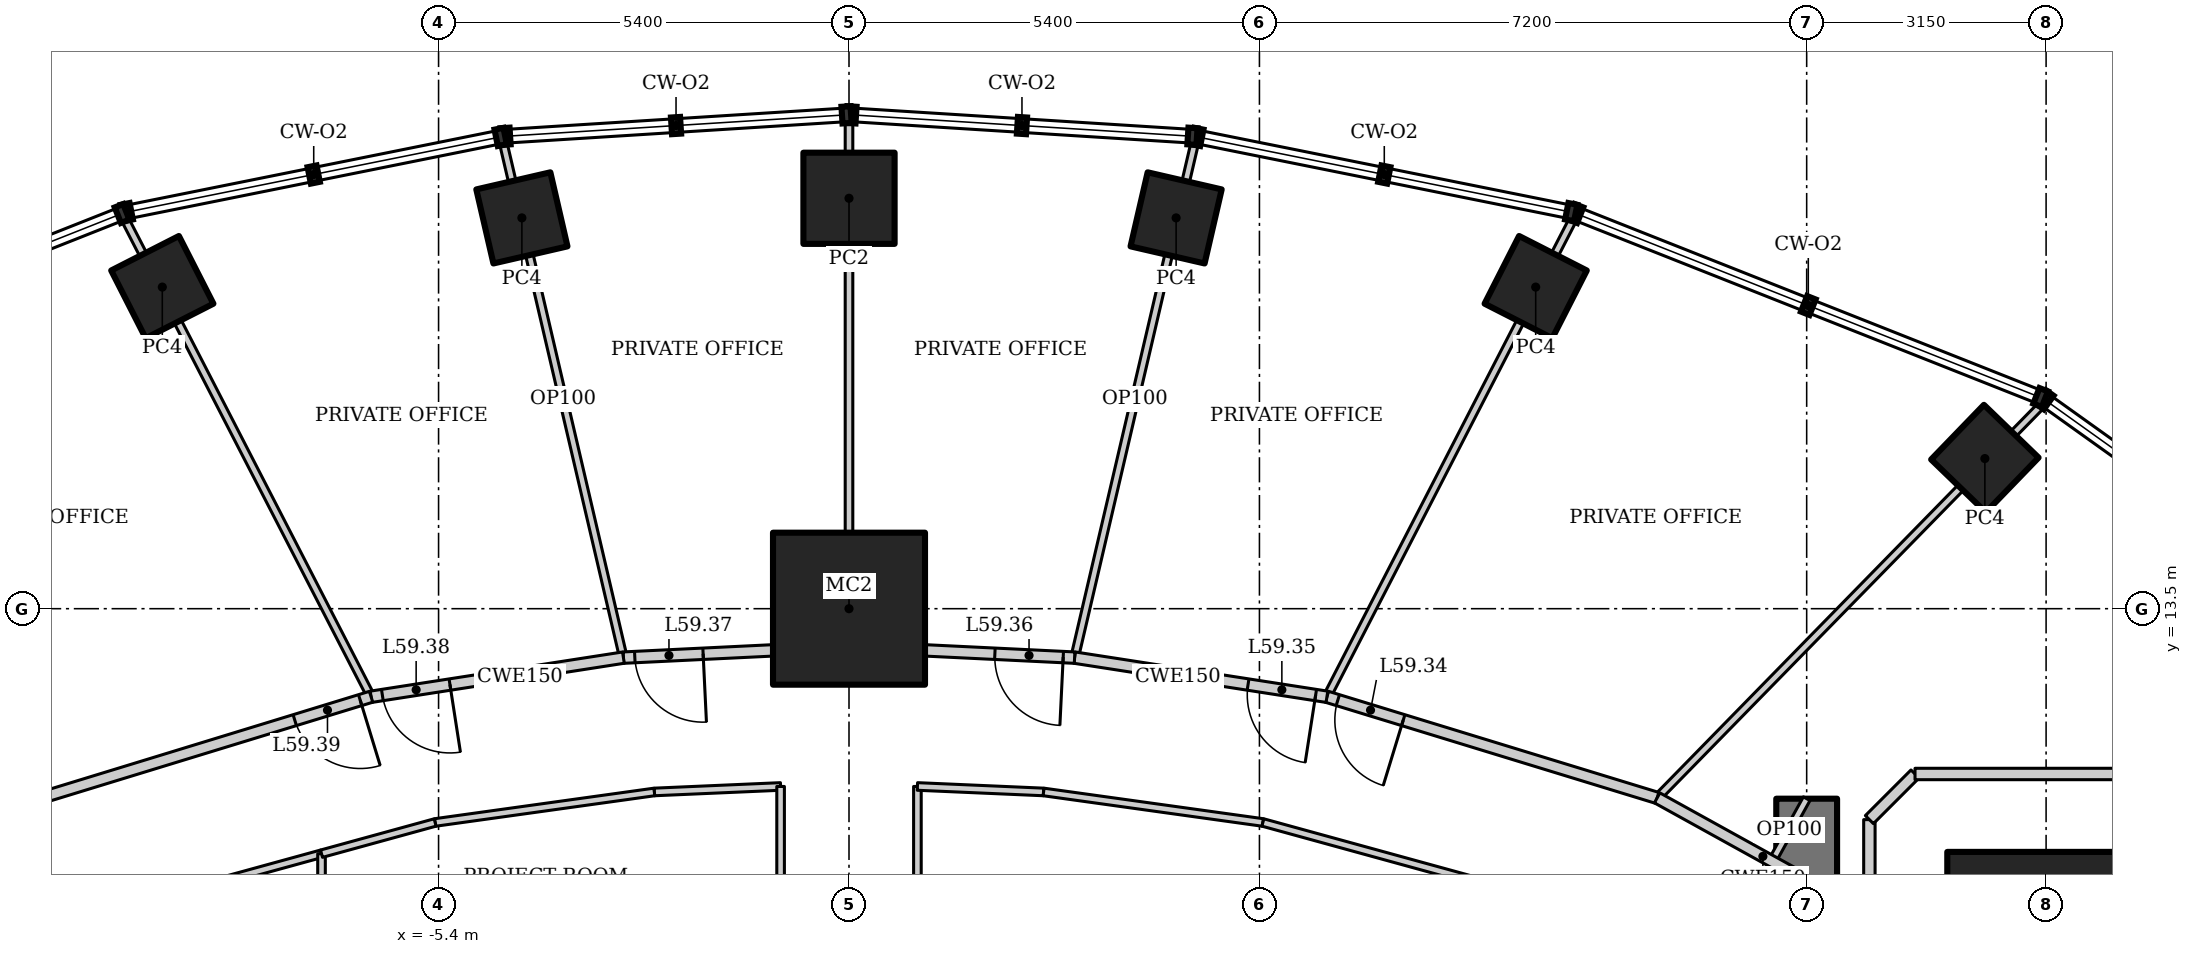
"""IFC4 building model, lengths in metres.
Left out: names, types, materials, properties, quantities, classifications, styles, units other than length and angle.
Written with IfcOpenShell. Run it as: python <this file> out.ifc"""

import sys

from ifc_helpers import new_model, si_unit, direction, frame, frame_2d, origin, origin_2d, place, context, subcontext, project, spatial, rectangle, hollow_rectangle, extrude, element, fill, save


model = new_model("IFC4")
c1 = context("Model", 3, precision=1e-05, world=origin(), true_north=direction((0.0, 1.0)))
c2 = subcontext(c1, "Body", "Model", "MODEL_VIEW")
j1 = project(units=[si_unit("LENGTHUNIT", "METRE"), si_unit("PLANEANGLEUNIT", "RADIAN")], contexts=[c1])
p1 = place(None, origin())
s1 = spatial("IfcSite", under=j1, at=p1, CompositionType="ELEMENT")
p2 = place(p1, origin())
s2 = spatial("IfcBuilding", under=s1, at=p2, CompositionType="ELEMENT")
p3 = place(p2, frame((0.0, 0.0, 253.6)))
s3 = spatial("IfcBuildingStorey", under=s2, at=p3, CompositionType="ELEMENT", Elevation=253.6)
p4 = place(p3, frame((15.75, 9.0, 0.0), z_axis=(0.0, 0.0, 1.0), x_axis=(1.0, 0.0, 0.0)))
e1 = element("IfcColumn", 1, at=p4, inside=s3, PredefinedType="COLUMN", context=c2, shape_type="SweptSolid", body=[
    extrude(hollow_rectangle(XDim=2.6, YDim=2.6, WallThickness=0.13, at=origin_2d()), origin(), (0.0, 0.0, 1.0), 4.2),
])
p5 = place(p3, frame((0.0, 13.5, 0.0), z_axis=(0.0, 0.0, 1.0), x_axis=(1.0, 0.0, 0.0)))
e2 = element("IfcColumn", 2, at=p5, inside=s3, PredefinedType="COLUMN", context=c2, shape_type="SweptSolid", body=[
    extrude(hollow_rectangle(XDim=2.0, YDim=2.0, WallThickness=0.17, at=origin_2d()), origin(), (0.0, 0.0, 1.0), 4.2),
])
for number, where, z_axis, x_axis in (
    (3, (14.944, 15.475, 0.0), (0.0, 0.0, 1.0), (0.695, 0.719, 0.0)),
    (4, (9.035, 17.731, 0.0), (0.0, 0.0, 1.0), (0.454, 0.891, 0.0)),
    (5, (4.304, 18.642, 0.0), (0.0, 0.0, 1.0), (0.225, 0.974, 0.0)),
):
    element("IfcColumn", number, at=place(p3, frame(where, z_axis=z_axis, x_axis=x_axis)), inside=s3, PredefinedType="COLUMN", context=c2, shape_type="SweptSolid", body=[
        extrude(hollow_rectangle(XDim=1.0, YDim=1.0, WallThickness=0.08, at=origin_2d()), origin(), (0.0, 0.0, 1.0), 4.2),
    ])
p6 = place(p3, frame((0.0, 18.9, 0.0), z_axis=(0.0, 0.0, 1.0), x_axis=(1.0, 0.0, 0.0)))
e6 = element("IfcColumn", 6, at=p6, inside=s3, PredefinedType="COLUMN", context=c2, shape_type="SweptSolid", body=[
    extrude(hollow_rectangle(XDim=1.2, YDim=1.2, WallThickness=0.1, at=origin_2d()), origin(), (0.0, 0.0, 1.0), 4.2),
])
for number, where, z_axis, x_axis in (
    (7, (-4.304, 18.642, 0.0), (0.0, 0.0, 1.0), (0.974, 0.225, 0.0)),
    (8, (-9.035, 17.731, 0.0), (0.0, 0.0, 1.0), (0.891, 0.454, 0.0)),
):
    element("IfcColumn", number, at=place(p3, frame(where, z_axis=z_axis, x_axis=x_axis)), inside=s3, PredefinedType="COLUMN", context=c2, shape_type="SweptSolid", body=[
        extrude(hollow_rectangle(XDim=1.0, YDim=1.0, WallThickness=0.08, at=origin_2d()), origin(), (0.0, 0.0, 1.0), 4.2),
    ])
p7 = place(p3, frame((12.6, -11.0, 0.0), z_axis=(0.0, 0.0, 1.0), x_axis=(0.0, 1.0, 0.0)))
e9 = element("IfcWall", 9, at=p7, inside=s3, PredefinedType="SHEAR", context=c2, shape_type="SweptSolid", body=[
    extrude(rectangle(XDim=22.0, YDim=0.8, at=frame_2d((11.0, 0.0))), origin(), (0.0, 0.0, 1.0), 4.2),
])
p8 = place(p7, frame((10.1, 0.0, 0.0)))
e10 = element("IfcOpeningElement", 10, at=p8, cuts=e9, PredefinedType="OPENING", context=c2, shape_type="SweptSolid", body=[
    extrude(rectangle(XDim=1.8, YDim=2.1, at=frame_2d((0.9, 1.05))), frame((0.0, 0.41, 0.0), z_axis=(0.0, -1.0, 0.0), x_axis=(1.0, 0.0, 0.0)), (0.0, 0.0, 1.0), 0.82),
])
p9 = place(p3, frame((15.709, 16.199, 0.0), z_axis=(0.0, 0.0, 1.0), x_axis=(-0.699362525935, -0.714767135029, 0.0)))
e11 = element("IfcWall", 11, at=p9, inside=s3, PredefinedType="PARTITIONING", context=c2, shape_type="SweptSolid", body=[
    extrude(rectangle(XDim=7.259, YDim=0.1, at=frame_2d((3.629, 0.0))), origin(), (0.0, 0.0, 1.0), 3.41),
])
p10 = place(p3, frame((9.54, 18.65, 0.0), z_axis=(0.0, 0.0, 1.0), x_axis=(-0.45810402165, -0.88889859115, 0.0)))
e12 = element("IfcWall", 12, at=p10, inside=s3, PredefinedType="PARTITIONING", context=c2, shape_type="SweptSolid", body=[
    extrude(rectangle(XDim=7.098, YDim=0.1, at=frame_2d((3.549, 0.0))), origin(), (0.0, 0.0, 1.0), 3.108),
])
p11 = place(p3, frame((4.556, 19.657, 0.0), z_axis=(0.0, 0.0, 1.0), x_axis=(-0.22733791689, -0.973815933092, 0.0)))
e13 = element("IfcWall", 13, at=p11, inside=s3, PredefinedType="PARTITIONING", context=c2, shape_type="SweptSolid", body=[
    extrude(rectangle(XDim=6.984, YDim=0.1, at=frame_2d((3.492, 0.0))), origin(), (0.0, 0.0, 1.0), 3.108),
])
p12 = place(p3, frame((0.0, 19.945, 0.0), z_axis=(0.0, 0.0, 1.0), x_axis=(0.0, -1.0, 0.0)))
e14 = element("IfcWall", 14, at=p12, inside=s3, PredefinedType="PARTITIONING", context=c2, shape_type="SweptSolid", body=[
    extrude(rectangle(XDim=6.945, YDim=0.1, at=frame_2d((3.472, 0.0))), origin(), (0.0, 0.0, 1.0), 3.644),
])
p13 = place(p3, frame((-4.556, 19.657, 0.0), z_axis=(0.0, 0.0, 1.0), x_axis=(0.22733791689, -0.973815933092, 0.0)))
e15 = element("IfcWall", 15, at=p13, inside=s3, PredefinedType="PARTITIONING", context=c2, shape_type="SweptSolid", body=[
    extrude(rectangle(XDim=6.984, YDim=0.1, at=frame_2d((3.492, 0.0))), origin(), (0.0, 0.0, 1.0), 3.108),
])
p14 = place(p3, frame((-9.54, 18.65, 0.0), z_axis=(0.0, 0.0, 1.0), x_axis=(0.45810402165, -0.88889859115, 0.0)))
e16 = element("IfcWall", 16, at=p14, inside=s3, PredefinedType="PARTITIONING", context=c2, shape_type="SweptSolid", body=[
    extrude(rectangle(XDim=7.098, YDim=0.1, at=frame_2d((3.549, 0.0))), origin(), (0.0, 0.0, 1.0), 3.108),
])
p15 = place(p3, frame((10.633, 11.01, 0.0), z_axis=(0.0, 0.0, 1.0), x_axis=(-0.956185837153, 0.292760388079, 0.0)))
e17 = element("IfcWall", 17, at=p15, inside=s3, PredefinedType="PARTITIONING", context=c2, shape_type="SweptSolid", body=[
    extrude(rectangle(XDim=4.544, YDim=0.15, at=frame_2d((2.272, 0.0))), origin(), (0.0, 0.0, 1.0), 4.05),
])
p16 = place(p15, frame((3.494, 0.0, 0.0)))
e18 = element("IfcOpeningElement", 18, at=p16, cuts=e17, PredefinedType="OPENING", context=c2, shape_type="SweptSolid", body=[
    extrude(rectangle(XDim=0.9, YDim=2.1, at=frame_2d((0.45, 1.05))), frame((0.0, 0.085, 0.0), z_axis=(0.0, -1.0, 0.0), x_axis=(1.0, 0.0, 0.0)), (0.0, 0.0, 1.0), 0.17),
])
p17 = place(p3, frame((6.288, 12.341, 0.0), z_axis=(0.0, 0.0, 1.0), x_axis=(-0.988174283057, 0.153334882869, 0.0)))
e19 = element("IfcWall", 19, at=p17, inside=s3, PredefinedType="PARTITIONING", context=c2, shape_type="SweptSolid", body=[
    extrude(rectangle(XDim=3.36, YDim=0.15, at=frame_2d((1.68, 0.0))), origin(), (0.0, 0.0, 1.0), 4.05),
])
p18 = place(p17, frame((0.15, 0.0, 0.0)))
e20 = element("IfcOpeningElement", 20, at=p18, cuts=e19, PredefinedType="OPENING", context=c2, shape_type="SweptSolid", body=[
    extrude(rectangle(XDim=0.9, YDim=2.1, at=frame_2d((0.45, 1.05))), frame((0.0, 0.085, 0.0), z_axis=(0.0, -1.0, 0.0), x_axis=(1.0, 0.0, 0.0)), (0.0, 0.0, 1.0), 0.17),
])
p19 = place(p3, frame((2.968, 12.856, 0.0), z_axis=(0.0, 0.0, 1.0), x_axis=(-0.998824412818, 0.04847465687, 0.0)))
e21 = element("IfcWall", 21, at=p19, inside=s3, PredefinedType="PARTITIONING", context=c2, shape_type="SweptSolid", body=[
    extrude(rectangle(XDim=2.971, YDim=0.15, at=frame_2d((1.486, 0.0))), origin(), (0.0, 0.0, 1.0), 4.05),
])
p20 = place(p19, frame((0.15, 0.0, 0.0)))
e22 = element("IfcOpeningElement", 22, at=p20, cuts=e21, PredefinedType="OPENING", context=c2, shape_type="SweptSolid", body=[
    extrude(rectangle(XDim=0.9, YDim=2.1, at=frame_2d((0.45, 1.05))), frame((0.0, 0.085, 0.0), z_axis=(0.0, -1.0, 0.0), x_axis=(1.0, 0.0, 0.0)), (0.0, 0.0, 1.0), 0.17),
])
p21 = place(p3, frame((0.0, 13.0, 0.0), z_axis=(0.0, 0.0, 1.0), x_axis=(-0.998824412818, -0.04847465687, 0.0)))
e23 = element("IfcWall", 23, at=p21, inside=s3, PredefinedType="PARTITIONING", context=c2, shape_type="SweptSolid", body=[
    extrude(rectangle(XDim=2.971, YDim=0.15, at=frame_2d((1.486, 0.0))), origin(), (0.0, 0.0, 1.0), 4.05),
])
p22 = place(p21, frame((1.921, 0.0, 0.0)))
e24 = element("IfcOpeningElement", 24, at=p22, cuts=e23, PredefinedType="OPENING", context=c2, shape_type="SweptSolid", body=[
    extrude(rectangle(XDim=0.9, YDim=2.1, at=frame_2d((0.45, 1.05))), frame((0.0, 0.085, 0.0), z_axis=(0.0, -1.0, 0.0), x_axis=(1.0, 0.0, 0.0)), (0.0, 0.0, 1.0), 0.17),
])
p23 = place(p3, frame((-2.968, 12.856, 0.0), z_axis=(0.0, 0.0, 1.0), x_axis=(-0.988174283057, -0.153334882869, 0.0)))
e25 = element("IfcWall", 25, at=p23, inside=s3, PredefinedType="PARTITIONING", context=c2, shape_type="SweptSolid", body=[
    extrude(rectangle(XDim=3.36, YDim=0.15, at=frame_2d((1.68, 0.0))), origin(), (0.0, 0.0, 1.0), 4.05),
])
p24 = place(p23, frame((2.31, 0.0, 0.0)))
e26 = element("IfcOpeningElement", 26, at=p24, cuts=e25, PredefinedType="OPENING", context=c2, shape_type="SweptSolid", body=[
    extrude(rectangle(XDim=0.9, YDim=2.1, at=frame_2d((0.45, 1.05))), frame((0.0, 0.085, 0.0), z_axis=(0.0, -1.0, 0.0), x_axis=(1.0, 0.0, 0.0)), (0.0, 0.0, 1.0), 0.17),
])
p25 = place(p3, frame((-6.288, 12.341, 0.0), z_axis=(0.0, 0.0, 1.0), x_axis=(-0.956185837153, -0.292760388079, 0.0)))
e27 = element("IfcWall", 27, at=p25, inside=s3, PredefinedType="PARTITIONING", context=c2, shape_type="SweptSolid", body=[
    extrude(rectangle(XDim=4.544, YDim=0.15, at=frame_2d((2.272, 0.0))), origin(), (0.0, 0.0, 1.0), 4.05),
])
p26 = place(p25, frame((0.15, 0.0, 0.0)))
e28 = element("IfcOpeningElement", 28, at=p26, cuts=e27, PredefinedType="OPENING", context=c2, shape_type="SweptSolid", body=[
    extrude(rectangle(XDim=0.9, YDim=2.1, at=frame_2d((0.45, 1.05))), frame((0.0, 0.085, 0.0), z_axis=(0.0, -1.0, 0.0), x_axis=(1.0, 0.0, 0.0)), (0.0, 0.0, 1.0), 0.17),
])
p27 = place(p3, frame((0.9, 8.8, 0.0), z_axis=(0.0, 0.0, 1.0), x_axis=(0.0, 1.0, 0.0)))
e29 = element("IfcWall", 29, at=p27, inside=s3, PredefinedType="PARTITIONING", context=c2, shape_type="SweptSolid", body=[
    extrude(rectangle(XDim=2.361, YDim=0.1, at=frame_2d((1.18, 0.0))), origin(), (0.0, 0.0, 1.0), 4.05),
])
p28 = place(p3, frame((0.9, 11.161, 0.0), z_axis=(0.0, 0.0, 1.0), x_axis=(0.999053939397, -0.043488230303, 0.0)))
e30 = element("IfcWall", 30, at=p28, inside=s3, PredefinedType="PARTITIONING", context=c2, shape_type="SweptSolid", body=[
    extrude(rectangle(XDim=1.662, YDim=0.1, at=frame_2d((0.831, 0.0))), origin(), (0.0, 0.0, 1.0), 4.05),
])
p29 = place(p3, frame((2.56, 11.089, 0.0), z_axis=(0.0, 0.0, 1.0), x_axis=(0.99045099049, -0.137865280027, 0.0)))
e31 = element("IfcWall", 31, at=p29, inside=s3, PredefinedType="PARTITIONING", context=c2, shape_type="SweptSolid", body=[
    extrude(rectangle(XDim=2.913, YDim=0.1, at=frame_2d((1.457, 0.0))), origin(), (0.0, 0.0, 1.0), 4.05),
])
p30 = place(p3, frame((5.445, 10.687, 0.0), z_axis=(0.0, 0.0, 1.0), x_axis=(0.964244438722, -0.265014456954, 0.0)))
e32 = element("IfcWall", 32, at=p30, inside=s3, PredefinedType="PARTITIONING", context=c2, shape_type="SweptSolid", body=[
    extrude(rectangle(XDim=3.995, YDim=0.1, at=frame_2d((1.998, 0.0))), origin(), (0.0, 0.0, 1.0), 4.05),
])
p31 = place(p3, frame((-9.298, 9.628, 0.0), z_axis=(0.0, 0.0, 1.0), x_axis=(0.964255150805, 0.264975478385, 0.0)))
e33 = element("IfcWall", 33, at=p31, inside=s3, PredefinedType="PARTITIONING", context=c2, shape_type="SweptSolid", body=[
    extrude(rectangle(XDim=2.445, YDim=0.1, at=frame_2d((1.223, 0.0))), origin(), (0.0, 0.0, 1.0), 4.05),
])
p32 = place(p3, frame((-6.94, 10.276, 0.0), z_axis=(0.0, 0.0, 1.0), x_axis=(0.0, -1.0, 0.0)))
e34 = element("IfcWall", 34, at=p32, inside=s3, PredefinedType="PARTITIONING", context=c2, shape_type="SweptSolid", body=[
    extrude(rectangle(XDim=2.476, YDim=0.1, at=frame_2d((1.238, 0.0))), origin(), (0.0, 0.0, 1.0), 4.05),
])
p33 = place(p3, frame((-5.445, 10.687, 0.0), z_axis=(0.0, 0.0, 1.0), x_axis=(0.99045099049, 0.137865280027, 0.0)))
e35 = element("IfcWall", 35, at=p33, inside=s3, PredefinedType="PARTITIONING", context=c2, shape_type="SweptSolid", body=[
    extrude(rectangle(XDim=2.913, YDim=0.1, at=frame_2d((1.457, 0.0))), origin(), (0.0, 0.0, 1.0), 4.05),
])
p34 = place(p3, frame((-2.56, 11.089, 0.0), z_axis=(0.0, 0.0, 1.0), x_axis=(0.999053939397, 0.043488230303, 0.0)))
e36 = element("IfcWall", 36, at=p34, inside=s3, PredefinedType="PARTITIONING", context=c2, shape_type="SweptSolid", body=[
    extrude(rectangle(XDim=1.662, YDim=0.1, at=frame_2d((0.831, 0.0))), origin(), (0.0, 0.0, 1.0), 4.05),
])
p35 = place(p3, frame((-0.9, 11.161, 0.0), z_axis=(0.0, 0.0, 1.0), x_axis=(0.0, -1.0, 0.0)))
e37 = element("IfcWall", 37, at=p35, inside=s3, PredefinedType="PARTITIONING", context=c2, shape_type="SweptSolid", body=[
    extrude(rectangle(XDim=2.361, YDim=0.1, at=frame_2d((1.18, 0.0))), origin(), (0.0, 0.0, 1.0), 4.05),
])
p36 = place(p3, frame((-6.94, 10.276, 0.0), z_axis=(0.0, 0.0, 1.0), x_axis=(0.964227536736, 0.265075946476, 0.0)))
e38 = element("IfcWall", 38, at=p36, inside=s3, PredefinedType="PARTITIONING", context=c2, shape_type="SweptSolid", body=[
    extrude(rectangle(XDim=1.55, YDim=0.1, at=frame_2d((0.775, 0.0))), origin(), (0.0, 0.0, 1.0), 4.05),
])
p37 = place(p3, frame((12.6, 11.0, 0.0), z_axis=(0.0, 0.0, 1.0), x_axis=(-0.484103558985, -0.875010710893, 0.0)))
e39 = element("IfcWall", 39, at=p37, inside=s3, PredefinedType="PARTITIONING", context=c2, shape_type="SweptSolid", body=[
    extrude(rectangle(XDim=0.943, YDim=0.1, at=frame_2d((0.472, 0.0))), origin(), (0.0, 0.0, 1.0), 4.05),
])
p38 = place(p3, frame((13.415, 9.472, 0.0), z_axis=(0.0, 0.0, 1.0), x_axis=(-0.875072100837, 0.483992580869, 0.0)))
e40 = element("IfcWall", 40, at=p38, inside=s3, PredefinedType="PARTITIONING", context=c2, shape_type="SweptSolid", body=[
    extrude(rectangle(XDim=3.179, YDim=0.15, at=frame_2d((1.59, 0.0))), origin(), (0.0, 0.0, 1.0), 4.05),
])
p39 = place(p3, frame((13.425, 9.586, 0.0), z_axis=(0.0, 0.0, 1.0), x_axis=(0.0, 1.0, 0.0)))
e41 = element("IfcWall", 41, at=p39, inside=s3, PredefinedType="PARTITIONING", context=c2, shape_type="SweptSolid", body=[
    extrude(rectangle(XDim=1.138, YDim=0.15, at=frame_2d((0.569, 0.0))), origin(), (0.0, 0.0, 1.0), 4.05),
])
p40 = place(p3, frame((13.425, 10.725, 0.0), z_axis=(0.0, 0.0, 1.0), x_axis=(0.707106781187, 0.707106781187, 0.0)))
e42 = element("IfcWall", 42, at=p40, inside=s3, PredefinedType="PARTITIONING", context=c2, shape_type="SweptSolid", body=[
    extrude(rectangle(XDim=0.849, YDim=0.15, at=frame_2d((0.425, 0.0))), origin(), (0.0, 0.0, 1.0), 4.05),
])
p41 = place(p3, frame((14.025, 11.325, 0.0), z_axis=(0.0, 0.0, 1.0), x_axis=(1.0, 0.0, 0.0)))
e43 = element("IfcWall", 43, at=p41, inside=s3, PredefinedType="PARTITIONING", context=c2, shape_type="SweptSolid", body=[
    extrude(rectangle(XDim=3.449, YDim=0.15, at=frame_2d((1.725, 0.0))), origin(), (0.0, 0.0, 1.0), 4.05),
])
p42 = place(p16, origin())
e44 = element("IfcDoor", 44, at=p42, inside=s3, OperationType="SINGLE_SWING_LEFT", PredefinedType="DOOR", context=c2, shape_type="SweptSolid", body=[
    extrude(rectangle(XDim=0.9, YDim=2.1, at=frame_2d((0.45, 1.05))), frame((0.0, 0.025, 0.0), z_axis=(0.0, -1.0, 0.0), x_axis=(1.0, 0.0, 0.0)), (0.0, 0.0, 1.0), 0.05),
])
fill(e18, e44)
p43 = place(p18, origin())
e45 = element("IfcDoor", 45, at=p43, inside=s3, OperationType="SINGLE_SWING_LEFT", PredefinedType="DOOR", context=c2, shape_type="SweptSolid", body=[
    extrude(rectangle(XDim=0.9, YDim=2.1, at=frame_2d((0.45, 1.05))), frame((0.0, 0.025, 0.0), z_axis=(0.0, -1.0, 0.0), x_axis=(1.0, 0.0, 0.0)), (0.0, 0.0, 1.0), 0.05),
])
fill(e20, e45)
p44 = place(p20, origin())
e46 = element("IfcDoor", 46, at=p44, inside=s3, OperationType="SINGLE_SWING_LEFT", PredefinedType="DOOR", context=c2, shape_type="SweptSolid", body=[
    extrude(rectangle(XDim=0.9, YDim=2.1, at=frame_2d((0.45, 1.05))), frame((0.0, 0.025, 0.0), z_axis=(0.0, -1.0, 0.0), x_axis=(1.0, 0.0, 0.0)), (0.0, 0.0, 1.0), 0.05),
])
fill(e22, e46)
p45 = place(p22, origin())
e47 = element("IfcDoor", 47, at=p45, inside=s3, OperationType="SINGLE_SWING_LEFT", PredefinedType="DOOR", context=c2, shape_type="SweptSolid", body=[
    extrude(rectangle(XDim=0.9, YDim=2.1, at=frame_2d((0.45, 1.05))), frame((0.0, 0.025, 0.0), z_axis=(0.0, -1.0, 0.0), x_axis=(1.0, 0.0, 0.0)), (0.0, 0.0, 1.0), 0.05),
])
fill(e24, e47)
p46 = place(p24, origin())
e48 = element("IfcDoor", 48, at=p46, inside=s3, OperationType="SINGLE_SWING_LEFT", PredefinedType="DOOR", context=c2, shape_type="SweptSolid", body=[
    extrude(rectangle(XDim=0.9, YDim=2.1, at=frame_2d((0.45, 1.05))), frame((0.0, 0.025, 0.0), z_axis=(0.0, -1.0, 0.0), x_axis=(1.0, 0.0, 0.0)), (0.0, 0.0, 1.0), 0.05),
])
fill(e26, e48)
p47 = place(p26, origin())
e49 = element("IfcDoor", 49, at=p47, inside=s3, OperationType="SINGLE_SWING_LEFT", PredefinedType="DOOR", context=c2, shape_type="SweptSolid", body=[
    extrude(rectangle(XDim=0.9, YDim=2.1, at=frame_2d((0.45, 1.05))), frame((0.0, 0.025, 0.0), z_axis=(0.0, -1.0, 0.0), x_axis=(1.0, 0.0, 0.0)), (0.0, 0.0, 1.0), 0.05),
])
fill(e28, e49)
save(model, sys.argv[1])
